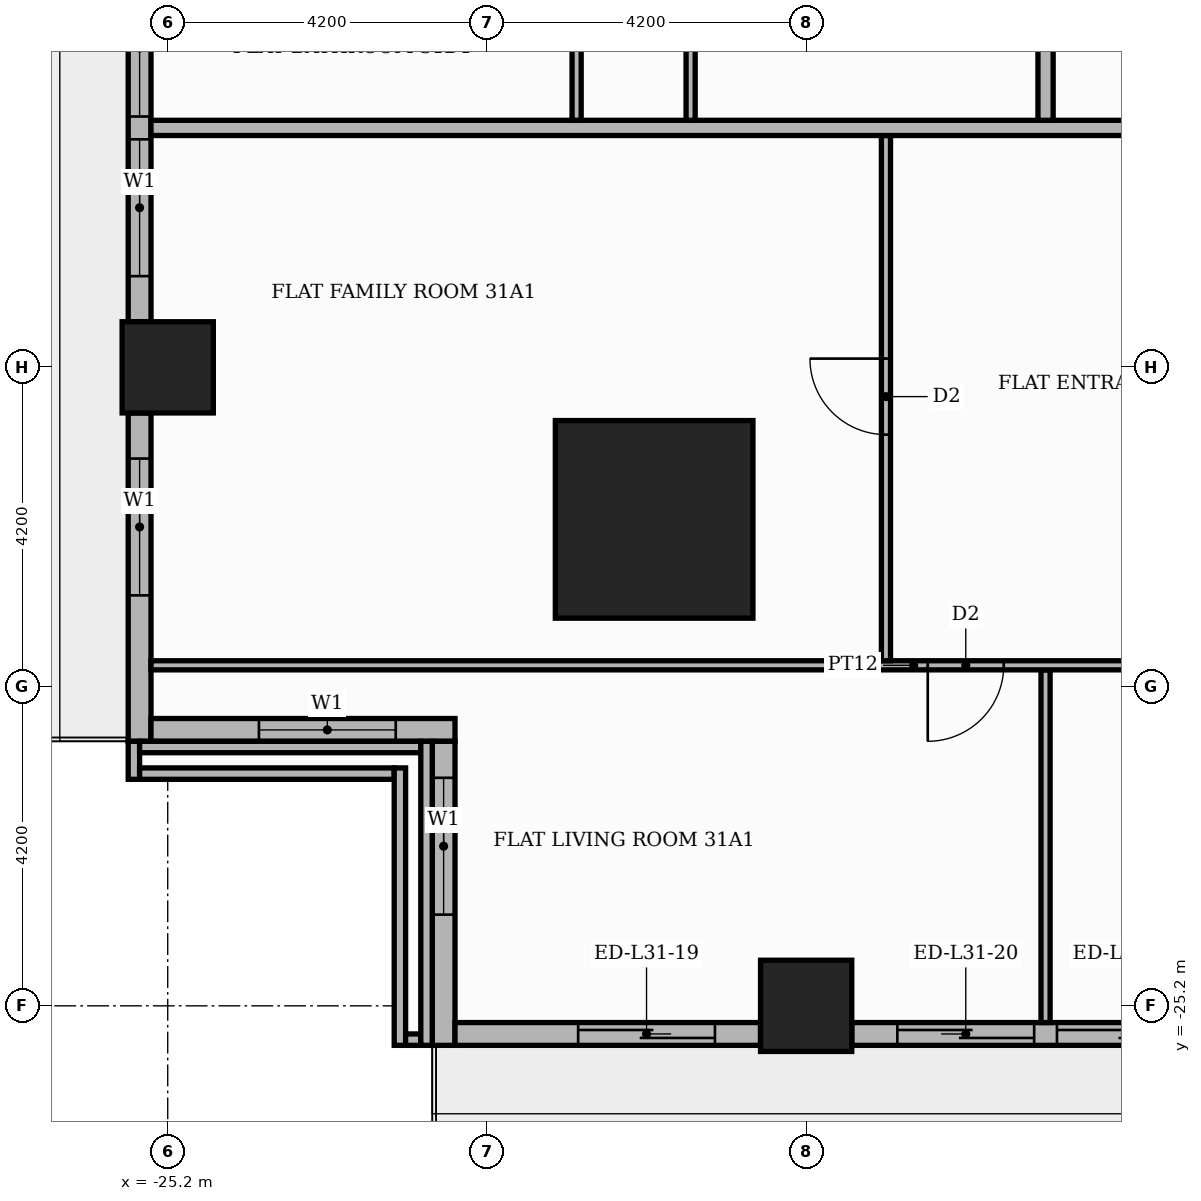
"""IFC4 building model, lengths in metres.
Left out: names, types, materials, properties, quantities, classifications, styles, units other than length and angle.
Written with IfcOpenShell. Run it as: python <this file> out.ifc"""

import sys

from ifc_helpers import new_model, si_unit, direction, frame, frame_2d, origin, origin_2d, place, context, subcontext, project, spatial, rectangle, extrude, element, fill, save


model = new_model("IFC4")
c1 = context("Model", 3, precision=1e-05, world=origin(), true_north=direction((0.0, 1.0)))
c2 = subcontext(c1, "Body", "Model", "MODEL_VIEW")
j1 = project(units=[si_unit("LENGTHUNIT", "METRE"), si_unit("PLANEANGLEUNIT", "RADIAN")], contexts=[c1])
p1 = place(None, origin())
s1 = spatial("IfcSite", under=j1, at=p1, CompositionType="ELEMENT")
p2 = place(p1, origin())
s2 = spatial("IfcBuilding", under=s1, at=p2, CompositionType="ELEMENT")
p3 = place(p2, frame((0.0, 0.0, 133.8)))
s3 = spatial("IfcBuildingStorey", under=s2, at=p3, CompositionType="ELEMENT", Elevation=133.8)
p4 = place(p3, frame((-18.8, -18.8, 0.0), z_axis=(0.0, 0.0, 1.0), x_axis=(1.0, 0.0, 0.0)))
e1 = element("IfcColumn", 1, at=p4, inside=s3, PredefinedType="COLUMN", context=c2, shape_type="SweptSolid", body=[
    extrude(rectangle(XDim=2.6, YDim=2.6, at=origin_2d()), origin(), (0.0, 0.0, 1.0), 3.9),
])
for number, where, z_axis, x_axis in (
    (2, (-16.8, -25.2, 0.0), (0.0, 0.0, 1.0), (1.0, 0.0, 0.0)),
    (3, (-25.2, -16.8, 0.0), (0.0, 0.0, 1.0), (1.0, 0.0, 0.0)),
):
    element("IfcColumn", number, at=place(p3, frame(where, z_axis=z_axis, x_axis=x_axis)), inside=s3, PredefinedType="COLUMN", context=c2, shape_type="SweptSolid", body=[
        extrude(rectangle(XDim=1.2, YDim=1.2, at=origin_2d()), origin(), (0.0, 0.0, 1.0), 3.9),
    ])
p5 = place(p3, frame((-25.57, -9.0, 0.0), z_axis=(0.0, 0.0, 1.0), x_axis=(0.0, -1.0, 0.0)))
e4 = element("IfcWall", 4, at=p5, inside=s3, PredefinedType="STANDARD", context=c2, shape_type="SweptSolid", body=[
    extrude(rectangle(XDim=7.2, YDim=0.3, at=frame_2d((3.6, 0.0))), origin(), (0.0, 0.0, 1.0), 3.48),
])
p6 = place(p5, frame((0.6, 0.0, 0.9)))
e5 = element("IfcOpeningElement", 5, at=p6, cuts=e4, PredefinedType="OPENING", context=c2, shape_type="SweptSolid", body=[
    extrude(rectangle(XDim=1.8, YDim=2.1, at=frame_2d((0.9, 1.05))), frame((0.0, 0.16, 0.0), z_axis=(0.0, -1.0, 0.0), x_axis=(1.0, 0.0, 0.0)), (0.0, 0.0, 1.0), 0.32),
])
p7 = place(p5, frame((2.7, 0.0, 0.9)))
e6 = element("IfcOpeningElement", 6, at=p7, cuts=e4, PredefinedType="OPENING", context=c2, shape_type="SweptSolid", body=[
    extrude(rectangle(XDim=1.8, YDim=2.1, at=frame_2d((0.9, 1.05))), frame((0.0, 0.16, 0.0), z_axis=(0.0, -1.0, 0.0), x_axis=(1.0, 0.0, 0.0)), (0.0, 0.0, 1.0), 0.32),
])
p8 = place(p5, frame((4.8, 0.0, 0.9)))
e7 = element("IfcOpeningElement", 7, at=p8, cuts=e4, PredefinedType="OPENING", context=c2, shape_type="SweptSolid", body=[
    extrude(rectangle(XDim=1.8, YDim=2.1, at=frame_2d((0.9, 1.05))), frame((0.0, 0.16, 0.0), z_axis=(0.0, -1.0, 0.0), x_axis=(1.0, 0.0, 0.0)), (0.0, 0.0, 1.0), 0.32),
])
p9 = place(p3, frame((-25.57, -17.4, 0.0), z_axis=(0.0, 0.0, 1.0), x_axis=(0.0, -1.0, 0.0)))
e8 = element("IfcWall", 8, at=p9, inside=s3, PredefinedType="STANDARD", context=c2, shape_type="SweptSolid", body=[
    extrude(rectangle(XDim=4.32, YDim=0.3, at=frame_2d((2.16, 0.0))), origin(), (0.0, 0.0, 1.0), 3.48),
])
p10 = place(p9, frame((0.6, 0.0, 0.9)))
e9 = element("IfcOpeningElement", 9, at=p10, cuts=e8, PredefinedType="OPENING", context=c2, shape_type="SweptSolid", body=[
    extrude(rectangle(XDim=1.8, YDim=2.1, at=frame_2d((0.9, 1.05))), frame((0.0, 0.16, 0.0), z_axis=(0.0, -1.0, 0.0), x_axis=(1.0, 0.0, 0.0)), (0.0, 0.0, 1.0), 0.32),
])
p11 = place(p3, frame((-25.42, -21.57, 0.0), z_axis=(0.0, 0.0, 1.0), x_axis=(1.0, 0.0, 0.0)))
e10 = element("IfcWall", 10, at=p11, inside=s3, PredefinedType="STANDARD", context=c2, shape_type="SweptSolid", body=[
    extrude(rectangle(XDim=4.0, YDim=0.3, at=frame_2d((2.0, 0.0))), origin(), (0.0, 0.0, 1.0), 3.48),
])
p12 = place(p11, frame((1.42, 0.0, 0.9)))
e11 = element("IfcOpeningElement", 11, at=p12, cuts=e10, PredefinedType="OPENING", context=c2, shape_type="SweptSolid", body=[
    extrude(rectangle(XDim=1.8, YDim=2.1, at=frame_2d((0.9, 1.05))), frame((0.0, 0.16, 0.0), z_axis=(0.0, -1.0, 0.0), x_axis=(1.0, 0.0, 0.0)), (0.0, 0.0, 1.0), 0.32),
])
p13 = place(p3, frame((-21.57, -21.72, 0.0), z_axis=(0.0, 0.0, 1.0), x_axis=(0.0, -1.0, 0.0)))
e12 = element("IfcWall", 12, at=p13, inside=s3, PredefinedType="STANDARD", context=c2, shape_type="SweptSolid", body=[
    extrude(rectangle(XDim=4.0, YDim=0.3, at=frame_2d((2.0, 0.0))), origin(), (0.0, 0.0, 1.0), 3.48),
])
p14 = place(p13, frame((0.48, 0.0, 0.9)))
e13 = element("IfcOpeningElement", 13, at=p14, cuts=e12, PredefinedType="OPENING", context=c2, shape_type="SweptSolid", body=[
    extrude(rectangle(XDim=1.8, YDim=2.1, at=frame_2d((0.9, 1.05))), frame((0.0, 0.16, 0.0), z_axis=(0.0, -1.0, 0.0), x_axis=(1.0, 0.0, 0.0)), (0.0, 0.0, 1.0), 0.32),
])
p15 = place(p3, frame((-21.42, -25.57, 0.0), z_axis=(0.0, 0.0, 1.0), x_axis=(1.0, 0.0, 0.0)))
e14 = element("IfcWall", 14, at=p15, inside=s3, PredefinedType="STANDARD", context=c2, shape_type="SweptSolid", body=[
    extrude(rectangle(XDim=4.02, YDim=0.3, at=frame_2d((2.01, 0.0))), origin(), (0.0, 0.0, 1.0), 3.48),
])
p16 = place(p15, frame((1.62, 0.0, 0.0)))
e15 = element("IfcOpeningElement", 15, at=p16, cuts=e14, PredefinedType="OPENING", context=c2, shape_type="SweptSolid", body=[
    extrude(rectangle(XDim=1.8, YDim=2.4, at=frame_2d((0.9, 1.2))), frame((0.0, 0.16, 0.0), z_axis=(0.0, -1.0, 0.0), x_axis=(1.0, 0.0, 0.0)), (0.0, 0.0, 1.0), 0.32),
])
p17 = place(p3, frame((-16.2, -25.57, 0.0), z_axis=(0.0, 0.0, 1.0), x_axis=(1.0, 0.0, 0.0)))
e16 = element("IfcWall", 16, at=p17, inside=s3, PredefinedType="STANDARD", context=c2, shape_type="SweptSolid", body=[
    extrude(rectangle(XDim=7.2, YDim=0.3, at=frame_2d((3.6, 0.0))), origin(), (0.0, 0.0, 1.0), 3.48),
])
p18 = place(p17, frame((0.6, 0.0, 0.0)))
e17 = element("IfcOpeningElement", 17, at=p18, cuts=e16, PredefinedType="OPENING", context=c2, shape_type="SweptSolid", body=[
    extrude(rectangle(XDim=1.8, YDim=2.4, at=frame_2d((0.9, 1.2))), frame((0.0, 0.16, 0.0), z_axis=(0.0, -1.0, 0.0), x_axis=(1.0, 0.0, 0.0)), (0.0, 0.0, 1.0), 0.32),
])
p19 = place(p17, frame((2.7, 0.0, 0.0)))
e18 = element("IfcOpeningElement", 18, at=p19, cuts=e16, PredefinedType="OPENING", context=c2, shape_type="SweptSolid", body=[
    extrude(rectangle(XDim=1.8, YDim=2.4, at=frame_2d((0.9, 1.2))), frame((0.0, 0.16, 0.0), z_axis=(0.0, -1.0, 0.0), x_axis=(1.0, 0.0, 0.0)), (0.0, 0.0, 1.0), 0.32),
])
p20 = place(p17, frame((4.8, 0.0, 0.9)))
e19 = element("IfcOpeningElement", 19, at=p20, cuts=e16, PredefinedType="OPENING", context=c2, shape_type="SweptSolid", body=[
    extrude(rectangle(XDim=1.8, YDim=2.1, at=frame_2d((0.9, 1.05))), frame((0.0, 0.16, 0.0), z_axis=(0.0, -1.0, 0.0), x_axis=(1.0, 0.0, 0.0)), (0.0, 0.0, 1.0), 0.32),
])
p21 = place(p3, frame((-25.645, -22.22, 0.0), z_axis=(0.0, 0.0, 1.0), x_axis=(0.0, 1.0, 0.0)))
e20 = element("IfcWall", 20, at=p21, inside=s3, PredefinedType="PARAPET", context=c2, shape_type="SweptSolid", body=[
    extrude(rectangle(XDim=0.5, YDim=0.15, at=frame_2d((0.25, 0.0))), origin(), (0.0, 0.0, 1.0), 1.1),
])
p22 = place(p3, frame((-25.57, -22.145, 0.0), z_axis=(0.0, 0.0, 1.0), x_axis=(1.0, 0.0, 0.0)))
e21 = element("IfcWall", 21, at=p22, inside=s3, PredefinedType="PARAPET", context=c2, shape_type="SweptSolid", body=[
    extrude(rectangle(XDim=3.35, YDim=0.15, at=frame_2d((1.675, 0.0))), origin(), (0.0, 0.0, 1.0), 1.1),
])
p23 = place(p3, frame((-25.57, -21.795, 0.0), z_axis=(0.0, 0.0, 1.0), x_axis=(1.0, 0.0, 0.0)))
e22 = element("IfcWall", 22, at=p23, inside=s3, PredefinedType="PARAPET", context=c2, shape_type="SweptSolid", body=[
    extrude(rectangle(XDim=3.7, YDim=0.15, at=frame_2d((1.85, 0.0))), origin(), (0.0, 0.0, 1.0), 1.1),
])
p24 = place(p3, frame((-22.145, -25.72, 0.0), z_axis=(0.0, 0.0, 1.0), x_axis=(0.0, 1.0, 0.0)))
e23 = element("IfcWall", 23, at=p24, inside=s3, PredefinedType="PARAPET", context=c2, shape_type="SweptSolid", body=[
    extrude(rectangle(XDim=3.65, YDim=0.15, at=frame_2d((1.825, 0.0))), origin(), (0.0, 0.0, 1.0), 1.1),
])
p25 = place(p3, frame((-22.07, -25.645, 0.0), z_axis=(0.0, 0.0, 1.0), x_axis=(1.0, 0.0, 0.0)))
e24 = element("IfcWall", 24, at=p25, inside=s3, PredefinedType="PARAPET", context=c2, shape_type="SweptSolid", body=[
    extrude(rectangle(XDim=0.2, YDim=0.15, at=frame_2d((0.1, 0.0))), origin(), (0.0, 0.0, 1.0), 1.1),
])
p26 = place(p3, frame((-21.795, -25.72, 0.0), z_axis=(0.0, 0.0, 1.0), x_axis=(0.0, 1.0, 0.0)))
e25 = element("IfcWall", 25, at=p26, inside=s3, PredefinedType="PARAPET", context=c2, shape_type="SweptSolid", body=[
    extrude(rectangle(XDim=4.0, YDim=0.15, at=frame_2d((2.0, 0.0))), origin(), (0.0, 0.0, 1.0), 1.1),
])
p27 = place(p3, frame((-13.65, -25.42, 0.0), z_axis=(0.0, 0.0, 1.0), x_axis=(0.0, 1.0, 0.0)))
e26 = element("IfcWall", 26, at=p27, inside=s3, PredefinedType="PARTITIONING", context=c2, shape_type="SweptSolid", body=[
    extrude(rectangle(XDim=4.64, YDim=0.12, at=frame_2d((2.32, 0.0))), origin(), (0.0, 0.0, 1.0), 3.48),
])
p28 = place(p3, frame((-25.42, -20.72, 0.0), z_axis=(0.0, 0.0, 1.0), x_axis=(1.0, 0.0, 0.0)))
e27 = element("IfcWall", 27, at=p28, inside=s3, PredefinedType="PARTITIONING", context=c2, shape_type="SweptSolid", body=[
    extrude(rectangle(XDim=20.07, YDim=0.12, at=frame_2d((10.035, 0.0))), origin(), (0.0, 0.0, 1.0), 3.48),
])
p29 = place(p28, frame((10.22, 0.0, 0.0)))
e28 = element("IfcOpeningElement", 28, at=p29, cuts=e27, PredefinedType="OPENING", context=c2, shape_type="SweptSolid", body=[
    extrude(rectangle(XDim=1.0, YDim=2.1, at=frame_2d((0.5, 1.05))), frame((0.0, 0.07, 0.0), z_axis=(0.0, -1.0, 0.0), x_axis=(1.0, 0.0, 0.0)), (0.0, 0.0, 1.0), 0.14),
])
p30 = place(p28, frame((13.42, 0.0, 0.0)))
e29 = element("IfcOpeningElement", 29, at=p30, cuts=e27, PredefinedType="OPENING", context=c2, shape_type="SweptSolid", body=[
    extrude(rectangle(XDim=0.9, YDim=2.1, at=frame_2d((0.45, 1.05))), frame((0.0, 0.07, 0.0), z_axis=(0.0, -1.0, 0.0), x_axis=(1.0, 0.0, 0.0)), (0.0, 0.0, 1.0), 0.14),
])
p31 = place(p3, frame((-15.75, -20.66, 0.0), z_axis=(0.0, 0.0, 1.0), x_axis=(0.0, 1.0, 0.0)))
e30 = element("IfcWall", 30, at=p31, inside=s3, PredefinedType="PARTITIONING", context=c2, shape_type="SweptSolid", body=[
    extrude(rectangle(XDim=6.91, YDim=0.12, at=frame_2d((3.455, 0.0))), origin(), (0.0, 0.0, 1.0), 3.48),
])
p32 = place(p31, frame((2.975, 0.0, 0.0)))
e31 = element("IfcOpeningElement", 31, at=p32, cuts=e30, PredefinedType="OPENING", context=c2, shape_type="SweptSolid", body=[
    extrude(rectangle(XDim=1.0, YDim=2.1, at=frame_2d((0.5, 1.05))), frame((0.0, 0.07, 0.0), z_axis=(0.0, -1.0, 0.0), x_axis=(1.0, 0.0, 0.0)), (0.0, 0.0, 1.0), 0.14),
])
p33 = place(p3, frame((-25.42, -13.65, 0.0), z_axis=(0.0, 0.0, 1.0), x_axis=(1.0, 0.0, 0.0)))
e32 = element("IfcWall", 32, at=p33, inside=s3, PredefinedType="PARTITIONING", context=c2, shape_type="SweptSolid", body=[
    extrude(rectangle(XDim=39.07, YDim=0.2, at=frame_2d((19.535, 0.0))), origin(), (0.0, 0.0, 1.0), 3.48),
])
p34 = place(p33, frame((13.32, 0.0, 0.0)))
e33 = element("IfcOpeningElement", 33, at=p34, cuts=e32, PredefinedType="OPENING", context=c2, shape_type="SweptSolid", body=[
    extrude(rectangle(XDim=1.1, YDim=2.4, at=frame_2d((0.55, 1.2))), frame((0.0, 0.11, 0.0), z_axis=(0.0, -1.0, 0.0), x_axis=(1.0, 0.0, 0.0)), (0.0, 0.0, 1.0), 0.22),
])
p35 = place(p33, frame((25.92, 0.0, 0.0)))
e34 = element("IfcOpeningElement", 34, at=p35, cuts=e32, PredefinedType="OPENING", context=c2, shape_type="SweptSolid", body=[
    extrude(rectangle(XDim=1.1, YDim=2.4, at=frame_2d((0.55, 1.2))), frame((0.0, 0.11, 0.0), z_axis=(0.0, -1.0, 0.0), x_axis=(1.0, 0.0, 0.0)), (0.0, 0.0, 1.0), 0.22),
])
p36 = place(p3, frame((-19.82, -13.55, 0.0), z_axis=(0.0, 0.0, 1.0), x_axis=(0.0, 1.0, 0.0)))
e35 = element("IfcWall", 35, at=p36, inside=s3, PredefinedType="PARTITIONING", context=c2, shape_type="SweptSolid", body=[
    extrude(rectangle(XDim=1.94, YDim=0.12, at=frame_2d((0.97, 0.0))), origin(), (0.0, 0.0, 1.0), 3.48),
])
p37 = place(p3, frame((-18.32, -13.55, 0.0), z_axis=(0.0, 0.0, 1.0), x_axis=(0.0, 1.0, 0.0)))
e36 = element("IfcWall", 36, at=p37, inside=s3, PredefinedType="PARTITIONING", context=c2, shape_type="SweptSolid", body=[
    extrude(rectangle(XDim=3.59, YDim=0.12, at=frame_2d((1.795, 0.0))), origin(), (0.0, 0.0, 1.0), 3.48),
])
p38 = place(p37, frame((1.325, 0.0, 0.0)))
e37 = element("IfcOpeningElement", 37, at=p38, cuts=e36, PredefinedType="OPENING", context=c2, shape_type="SweptSolid", body=[
    extrude(rectangle(XDim=0.9, YDim=2.1, at=frame_2d((0.45, 1.05))), frame((0.0, 0.07, 0.0), z_axis=(0.0, -1.0, 0.0), x_axis=(1.0, 0.0, 0.0)), (0.0, 0.0, 1.0), 0.14),
])
p39 = place(p3, frame((-13.65, -13.55, 0.0), z_axis=(0.0, 0.0, 1.0), x_axis=(0.0, 1.0, 0.0)))
e38 = element("IfcWall", 38, at=p39, inside=s3, PredefinedType="PARTITIONING", context=c2, shape_type="SweptSolid", body=[
    extrude(rectangle(XDim=2.45, YDim=0.2, at=frame_2d((1.225, 0.0))), origin(), (0.0, 0.0, 1.0), 3.48),
])
p40 = place(p7, origin())
e39 = element("IfcWindow", 39, at=p40, inside=s3, PartitioningType="SINGLE_PANEL", PredefinedType="WINDOW", context=c2, shape_type="SweptSolid", body=[
    extrude(rectangle(XDim=1.8, YDim=2.1, at=frame_2d((0.9, 1.05))), frame((0.0, 0.03, 0.0), z_axis=(0.0, -1.0, 0.0), x_axis=(1.0, 0.0, 0.0)), (0.0, 0.0, 1.0), 0.06),
])
fill(e6, e39)
p41 = place(p8, origin())
e40 = element("IfcWindow", 40, at=p41, inside=s3, PartitioningType="SINGLE_PANEL", PredefinedType="WINDOW", context=c2, shape_type="SweptSolid", body=[
    extrude(rectangle(XDim=1.8, YDim=2.1, at=frame_2d((0.9, 1.05))), frame((0.0, 0.03, 0.0), z_axis=(0.0, -1.0, 0.0), x_axis=(1.0, 0.0, 0.0)), (0.0, 0.0, 1.0), 0.06),
])
fill(e7, e40)
p42 = place(p10, origin())
e41 = element("IfcWindow", 41, at=p42, inside=s3, PartitioningType="SINGLE_PANEL", PredefinedType="WINDOW", context=c2, shape_type="SweptSolid", body=[
    extrude(rectangle(XDim=1.8, YDim=2.1, at=frame_2d((0.9, 1.05))), frame((0.0, 0.03, 0.0), z_axis=(0.0, -1.0, 0.0), x_axis=(1.0, 0.0, 0.0)), (0.0, 0.0, 1.0), 0.06),
])
fill(e9, e41)
p43 = place(p12, origin())
e42 = element("IfcWindow", 42, at=p43, inside=s3, PartitioningType="SINGLE_PANEL", PredefinedType="WINDOW", context=c2, shape_type="SweptSolid", body=[
    extrude(rectangle(XDim=1.8, YDim=2.1, at=frame_2d((0.9, 1.05))), frame((0.0, 0.03, 0.0), z_axis=(0.0, -1.0, 0.0), x_axis=(1.0, 0.0, 0.0)), (0.0, 0.0, 1.0), 0.06),
])
fill(e11, e42)
p44 = place(p14, origin())
e43 = element("IfcWindow", 43, at=p44, inside=s3, PartitioningType="SINGLE_PANEL", PredefinedType="WINDOW", context=c2, shape_type="SweptSolid", body=[
    extrude(rectangle(XDim=1.8, YDim=2.1, at=frame_2d((0.9, 1.05))), frame((0.0, 0.03, 0.0), z_axis=(0.0, -1.0, 0.0), x_axis=(1.0, 0.0, 0.0)), (0.0, 0.0, 1.0), 0.06),
])
fill(e13, e43)
p45 = place(p16, origin())
e44 = element("IfcDoor", 44, at=p45, inside=s3, OperationType="SLIDING_TO_RIGHT", PredefinedType="DOOR", context=c2, shape_type="SweptSolid", body=[
    extrude(rectangle(XDim=1.8, YDim=2.4, at=frame_2d((0.9, 1.2))), frame((0.0, 0.025, 0.0), z_axis=(0.0, -1.0, 0.0), x_axis=(1.0, 0.0, 0.0)), (0.0, 0.0, 1.0), 0.05),
])
fill(e15, e44)
p46 = place(p18, origin())
e45 = element("IfcDoor", 45, at=p46, inside=s3, OperationType="SLIDING_TO_LEFT", PredefinedType="DOOR", context=c2, shape_type="SweptSolid", body=[
    extrude(rectangle(XDim=1.8, YDim=2.4, at=frame_2d((0.9, 1.2))), frame((0.0, 0.025, 0.0), z_axis=(0.0, -1.0, 0.0), x_axis=(1.0, 0.0, 0.0)), (0.0, 0.0, 1.0), 0.05),
])
fill(e17, e45)
p47 = place(p19, origin())
e46 = element("IfcDoor", 46, at=p47, inside=s3, OperationType="SLIDING_TO_RIGHT", PredefinedType="DOOR", context=c2, shape_type="SweptSolid", body=[
    extrude(rectangle(XDim=1.8, YDim=2.4, at=frame_2d((0.9, 1.2))), frame((0.0, 0.025, 0.0), z_axis=(0.0, -1.0, 0.0), x_axis=(1.0, 0.0, 0.0)), (0.0, 0.0, 1.0), 0.05),
])
fill(e18, e46)
p48 = place(p32, origin())
e47 = element("IfcDoor", 47, at=p48, inside=s3, OperationType="SINGLE_SWING_RIGHT", PredefinedType="DOOR", context=c2, shape_type="SweptSolid", body=[
    extrude(rectangle(XDim=1.0, YDim=2.1, at=frame_2d((0.5, 1.05))), frame((0.0, 0.025, 0.0), z_axis=(0.0, -1.0, 0.0), x_axis=(1.0, 0.0, 0.0)), (0.0, 0.0, 1.0), 0.05),
])
fill(e31, e47)
p49 = place(p29, frame((1.0, 0.0, 0.0), z_axis=(0.0, 0.0, 1.0), x_axis=(-1.0, 0.0, 0.0)))
e48 = element("IfcDoor", 48, at=p49, inside=s3, OperationType="SINGLE_SWING_LEFT", PredefinedType="DOOR", context=c2, shape_type="SweptSolid", body=[
    extrude(rectangle(XDim=1.0, YDim=2.1, at=frame_2d((0.5, 1.05))), frame((0.0, 0.025, 0.0), z_axis=(0.0, -1.0, 0.0), x_axis=(1.0, 0.0, 0.0)), (0.0, 0.0, 1.0), 0.05),
])
fill(e28, e48)
save(model, sys.argv[1])
